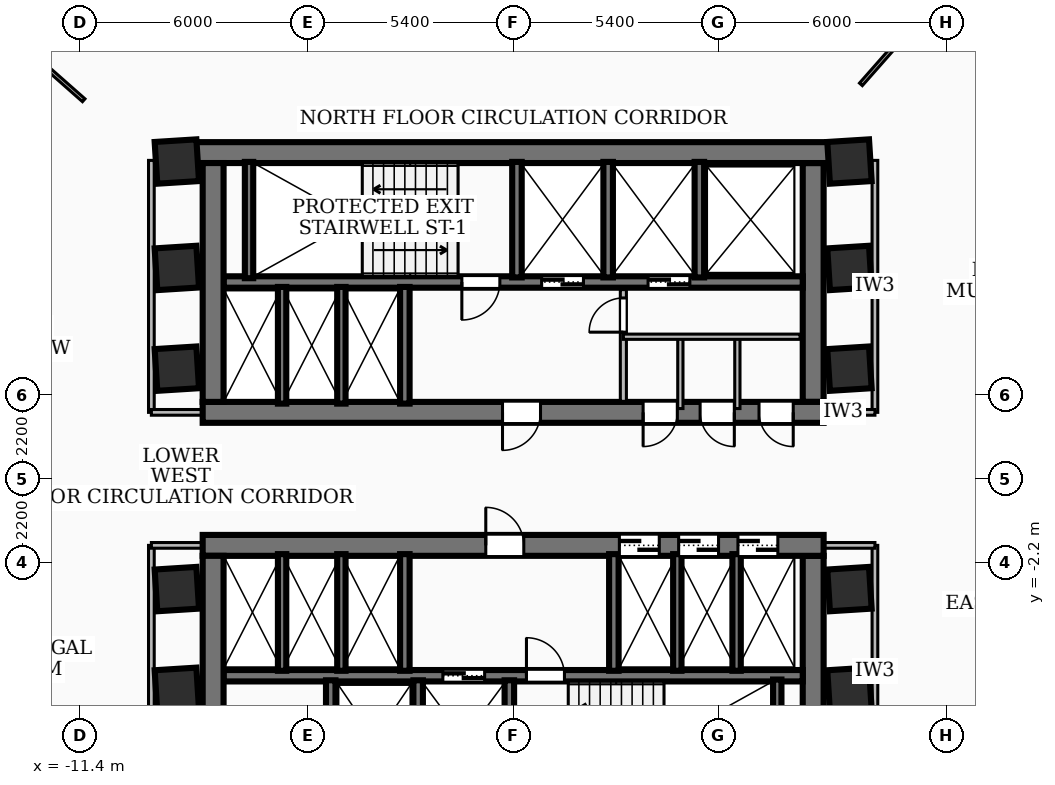
"""IFC4 building model, lengths in metres.
Left out: names, types, materials, properties, quantities, classifications, styles, units other than length and angle.
Written with IfcOpenShell. Run it as: python <this file> out.ifc"""

import sys

from ifc_helpers import new_model, si_unit, direction, frame, frame_2d, origin, origin_2d, place, context, subcontext, project, spatial, rectangle, extrude, element, fill, save


model = new_model("IFC4")
c1 = context("Model", 3, precision=1e-05, world=origin(), true_north=direction((0.0, 1.0)))
c2 = subcontext(c1, "Body", "Model", "MODEL_VIEW")
j1 = project(units=[si_unit("LENGTHUNIT", "METRE"), si_unit("PLANEANGLEUNIT", "RADIAN")], contexts=[c1])
p1 = place(None, origin())
s1 = spatial("IfcSite", under=j1, at=p1, CompositionType="ELEMENT")
p2 = place(p1, origin())
s2 = spatial("IfcBuilding", under=s1, at=p2, CompositionType="ELEMENT")
p3 = place(p2, frame((0.0, 0.0, 53.28)))
s3 = spatial("IfcBuildingStorey", under=s2, at=p3, CompositionType="ELEMENT", Elevation=53.28)
p4 = place(p3, frame((-8.78, 8.585, 0.0), z_axis=(0.0, 0.0, 1.0), x_axis=(1.0, 0.0, 0.0)))
e1 = element("IfcWall", 1, at=p4, inside=s3, PredefinedType="SHEAR", context=c2, shape_type="SweptSolid", body=[
    extrude(rectangle(XDim=17.56, YDim=0.55, at=frame_2d((8.78, 0.0))), origin(), (0.0, 0.0, 1.0), 3.32),
])
p5 = place(p3, frame((8.17, 1.75, 0.0), z_axis=(0.0, 0.0, 1.0), x_axis=(-1.0, 0.0, 0.0)))
e2 = element("IfcWall", 2, at=p5, inside=s3, PredefinedType="SHEAR", context=c2, shape_type="SweptSolid", body=[
    extrude(rectangle(XDim=16.34, YDim=0.55, at=frame_2d((8.17, 0.0))), origin(), (0.0, 0.0, 1.0), 3.32),
])
p6 = place(p5, frame((7.45, 0.0, 0.0)))
e3 = element("IfcOpeningElement", 3, at=p6, cuts=e2, PredefinedType="OPENING", context=c2, shape_type="SweptSolid", body=[
    extrude(rectangle(XDim=1.0, YDim=2.1, at=frame_2d((0.5, 1.05))), frame((0.0, 0.285, 0.0), z_axis=(0.0, -1.0, 0.0), x_axis=(1.0, 0.0, 0.0)), (0.0, 0.0, 1.0), 0.57),
])
p7 = place(p5, frame((3.85, 0.0, 0.0)))
e4 = element("IfcOpeningElement", 4, at=p7, cuts=e2, PredefinedType="OPENING", context=c2, shape_type="SweptSolid", body=[
    extrude(rectangle(XDim=0.9, YDim=2.06, at=frame_2d((0.45, 1.03))), frame((0.0, 0.285, 0.0), z_axis=(0.0, -1.0, 0.0), x_axis=(1.0, 0.0, 0.0)), (0.0, 0.0, 1.0), 0.57),
])
p8 = place(p5, frame((2.35, 0.0, 0.0)))
e5 = element("IfcOpeningElement", 5, at=p8, cuts=e2, PredefinedType="OPENING", context=c2, shape_type="SweptSolid", body=[
    extrude(rectangle(XDim=0.9, YDim=2.06, at=frame_2d((0.45, 1.03))), frame((0.0, 0.285, 0.0), z_axis=(0.0, -1.0, 0.0), x_axis=(1.0, 0.0, 0.0)), (0.0, 0.0, 1.0), 0.57),
])
p9 = place(p5, frame((0.8, 0.0, 0.0)))
e6 = element("IfcOpeningElement", 6, at=p9, cuts=e2, PredefinedType="OPENING", context=c2, shape_type="SweptSolid", body=[
    extrude(rectangle(XDim=0.9, YDim=2.06, at=frame_2d((0.45, 1.03))), frame((0.0, 0.285, 0.0), z_axis=(0.0, -1.0, 0.0), x_axis=(1.0, 0.0, 0.0)), (0.0, 0.0, 1.0), 0.57),
])
for number, where, z_axis, x_axis in (
    (7, (-7.895, 2.025, 0.0), (0.0, 0.0, 1.0), (0.0, 1.0, 0.0)),
    (8, (7.895, 8.31, 0.0), (0.0, 0.0, 1.0), (0.0, -1.0, 0.0)),
):
    element("IfcWall", number, at=place(p3, frame(where, z_axis=z_axis, x_axis=x_axis)), inside=s3, PredefinedType="SHEAR", context=c2, shape_type="SweptSolid", body=[
        extrude(rectangle(XDim=6.285, YDim=0.55, at=frame_2d((3.143, 0.0))), origin(), (0.0, 0.0, 1.0), 3.32),
    ])
p10 = place(p3, frame((7.62, 5.18, 0.0), z_axis=(0.0, 0.0, 1.0), x_axis=(-1.0, 0.0, 0.0)))
e9 = element("IfcWall", 9, at=p10, inside=s3, PredefinedType="SOLIDWALL", context=c2, shape_type="SweptSolid", body=[
    extrude(rectangle(XDim=15.24, YDim=0.3, at=frame_2d((7.62, 0.0))), origin(), (0.0, 0.0, 1.0), 3.32),
])
p11 = place(p10, frame((5.77, 0.0, 0.0)))
e10 = element("IfcOpeningElement", 10, at=p11, cuts=e9, PredefinedType="OPENING", context=c2, shape_type="SweptSolid", body=[
    extrude(rectangle(XDim=1.1, YDim=2.15, at=frame_2d((0.55, 1.075))), frame((0.0, 0.16, 0.0), z_axis=(0.0, -1.0, 0.0), x_axis=(1.0, 0.0, 0.0)), (0.0, 0.0, 1.0), 0.32),
])
p12 = place(p10, frame((2.97, 0.0, 0.0)))
e11 = element("IfcOpeningElement", 11, at=p12, cuts=e9, PredefinedType="OPENING", context=c2, shape_type="SweptSolid", body=[
    extrude(rectangle(XDim=1.1, YDim=2.15, at=frame_2d((0.55, 1.075))), frame((0.0, 0.16, 0.0), z_axis=(0.0, -1.0, 0.0), x_axis=(1.0, 0.0, 0.0)), (0.0, 0.0, 1.0), 0.32),
])
p13 = place(p10, frame((7.97, 0.0, 0.0)))
e12 = element("IfcOpeningElement", 12, at=p13, cuts=e9, PredefinedType="OPENING", context=c2, shape_type="SweptSolid", body=[
    extrude(rectangle(XDim=1.0, YDim=2.1, at=frame_2d((0.5, 1.05))), frame((0.0, 0.16, 0.0), z_axis=(0.0, -1.0, 0.0), x_axis=(1.0, 0.0, 0.0)), (0.0, 0.0, 1.0), 0.32),
])
p14 = place(p3, frame((-8.17, -1.75, 0.0), z_axis=(0.0, 0.0, 1.0), x_axis=(1.0, 0.0, 0.0)))
e13 = element("IfcWall", 13, at=p14, inside=s3, PredefinedType="SHEAR", context=c2, shape_type="SweptSolid", body=[
    extrude(rectangle(XDim=16.34, YDim=0.55, at=frame_2d((8.17, 0.0))), origin(), (0.0, 0.0, 1.0), 3.32),
])
p15 = place(p14, frame((7.45, 0.0, 0.0)))
e14 = element("IfcOpeningElement", 14, at=p15, cuts=e13, PredefinedType="OPENING", context=c2, shape_type="SweptSolid", body=[
    extrude(rectangle(XDim=1.0, YDim=2.1, at=frame_2d((0.5, 1.05))), frame((0.0, 0.285, 0.0), z_axis=(0.0, -1.0, 0.0), x_axis=(1.0, 0.0, 0.0)), (0.0, 0.0, 1.0), 0.57),
])
p16 = place(p14, frame((10.965, 0.0, 0.0)))
e15 = element("IfcOpeningElement", 15, at=p16, cuts=e13, PredefinedType="OPENING", context=c2, shape_type="SweptSolid", body=[
    extrude(rectangle(XDim=1.05, YDim=2.15, at=frame_2d((0.525, 1.075))), frame((0.0, 0.285, 0.0), z_axis=(0.0, -1.0, 0.0), x_axis=(1.0, 0.0, 0.0)), (0.0, 0.0, 1.0), 0.57),
])
p17 = place(p14, frame((12.525, 0.0, 0.0)))
e16 = element("IfcOpeningElement", 16, at=p17, cuts=e13, PredefinedType="OPENING", context=c2, shape_type="SweptSolid", body=[
    extrude(rectangle(XDim=1.05, YDim=2.15, at=frame_2d((0.525, 1.075))), frame((0.0, 0.285, 0.0), z_axis=(0.0, -1.0, 0.0), x_axis=(1.0, 0.0, 0.0)), (0.0, 0.0, 1.0), 0.57),
])
p18 = place(p14, frame((14.085, 0.0, 0.0)))
e17 = element("IfcOpeningElement", 17, at=p18, cuts=e13, PredefinedType="OPENING", context=c2, shape_type="SweptSolid", body=[
    extrude(rectangle(XDim=1.05, YDim=2.15, at=frame_2d((0.525, 1.075))), frame((0.0, 0.285, 0.0), z_axis=(0.0, -1.0, 0.0), x_axis=(1.0, 0.0, 0.0)), (0.0, 0.0, 1.0), 0.57),
])
for number, where, z_axis, x_axis in (
    (18, (-7.895, -8.31, 0.0), (0.0, 0.0, 1.0), (0.0, 1.0, 0.0)),
    (19, (7.895, -2.025, 0.0), (0.0, 0.0, 1.0), (0.0, -1.0, 0.0)),
):
    element("IfcWall", number, at=place(p3, frame(where, z_axis=z_axis, x_axis=x_axis)), inside=s3, PredefinedType="SHEAR", context=c2, shape_type="SweptSolid", body=[
        extrude(rectangle(XDim=6.285, YDim=0.55, at=frame_2d((3.143, 0.0))), origin(), (0.0, 0.0, 1.0), 3.32),
    ])
p19 = place(p3, frame((-7.62, -5.18, 0.0), z_axis=(0.0, 0.0, 1.0), x_axis=(1.0, 0.0, 0.0)))
e20 = element("IfcWall", 20, at=p19, inside=s3, PredefinedType="SOLIDWALL", context=c2, shape_type="SweptSolid", body=[
    extrude(rectangle(XDim=15.24, YDim=0.3, at=frame_2d((7.62, 0.0))), origin(), (0.0, 0.0, 1.0), 3.32),
])
p20 = place(p19, frame((5.77, 0.0, 0.0)))
e21 = element("IfcOpeningElement", 21, at=p20, cuts=e20, PredefinedType="OPENING", context=c2, shape_type="SweptSolid", body=[
    extrude(rectangle(XDim=1.1, YDim=2.15, at=frame_2d((0.55, 1.075))), frame((0.0, 0.16, 0.0), z_axis=(0.0, -1.0, 0.0), x_axis=(1.0, 0.0, 0.0)), (0.0, 0.0, 1.0), 0.32),
])
p21 = place(p19, frame((7.97, 0.0, 0.0)))
e22 = element("IfcOpeningElement", 22, at=p21, cuts=e20, PredefinedType="OPENING", context=c2, shape_type="SweptSolid", body=[
    extrude(rectangle(XDim=1.0, YDim=2.1, at=frame_2d((0.5, 1.05))), frame((0.0, 0.16, 0.0), z_axis=(0.0, -1.0, 0.0), x_axis=(1.0, 0.0, 0.0)), (0.0, 0.0, 1.0), 0.32),
])
for number, where, z_axis, x_axis in (
    (23, (-6.95, 5.28, 0.0), (0.0, 0.0, 1.0), (0.0, 1.0, 0.0)),
    (24, (6.95, -8.34, 0.0), (0.0, 0.0, 1.0), (0.0, 1.0, 0.0)),
):
    element("IfcWall", number, at=place(p3, frame(where, z_axis=z_axis, x_axis=x_axis)), inside=s3, PredefinedType="SOLIDWALL", context=c2, shape_type="SweptSolid", body=[
        extrude(rectangle(XDim=3.06, YDim=0.22, at=frame_2d((1.53, 0.0))), origin(), (0.0, 0.0, 1.0), 3.32),
    ])
for number, where, z_axis, x_axis in (
    (25, (0.1, 5.3, 0.0), (0.0, 0.0, 1.0), (0.0, 1.0, 0.0)),
    (26, (2.5, 5.3, 0.0), (0.0, 0.0, 1.0), (0.0, 1.0, 0.0)),
    (27, (4.9, 5.3, 0.0), (0.0, 0.0, 1.0), (0.0, 1.0, 0.0)),
):
    element("IfcWall", number, at=place(p3, frame(where, z_axis=z_axis, x_axis=x_axis)), inside=s3, PredefinedType="SOLIDWALL", context=c2, shape_type="SweptSolid", body=[
        extrude(rectangle(XDim=3.04, YDim=0.25, at=frame_2d((1.52, 0.0))), origin(), (0.0, 0.0, 1.0), 3.32),
    ])
p22 = place(p3, frame((-2.85, 1.98, 0.0), z_axis=(0.0, 0.0, 1.0), x_axis=(0.0, 1.0, 0.0)))
e28 = element("IfcWall", 28, at=p22, inside=s3, PredefinedType="SOLIDWALL", context=c2, shape_type="SweptSolid", body=[
    extrude(rectangle(XDim=3.07, YDim=0.25, at=frame_2d((1.535, 0.0))), origin(), (0.0, 0.0, 1.0), 3.32),
])
for number, where, z_axis, x_axis in (
    (29, (-0.1, -8.34, 0.0), (0.0, 0.0, 1.0), (0.0, 1.0, 0.0)),
    (30, (-2.5, -8.34, 0.0), (0.0, 0.0, 1.0), (0.0, 1.0, 0.0)),
    (31, (-4.8, -8.34, 0.0), (0.0, 0.0, 1.0), (0.0, 1.0, 0.0)),
):
    element("IfcWall", number, at=place(p3, frame(where, z_axis=z_axis, x_axis=x_axis)), inside=s3, PredefinedType="SOLIDWALL", context=c2, shape_type="SweptSolid", body=[
        extrude(rectangle(XDim=3.04, YDim=0.25, at=frame_2d((1.52, 0.0))), origin(), (0.0, 0.0, 1.0), 3.32),
    ])
for number, where, z_axis, x_axis in (
    (32, (-2.85, -5.05, 0.0), (0.0, 0.0, 1.0), (0.0, 1.0, 0.0)),
    (33, (2.65, -5.05, 0.0), (0.0, 0.0, 1.0), (0.0, 1.0, 0.0)),
):
    element("IfcWall", number, at=place(p3, frame(where, z_axis=z_axis, x_axis=x_axis)), inside=s3, PredefinedType="SOLIDWALL", context=c2, shape_type="SweptSolid", body=[
        extrude(rectangle(XDim=3.07, YDim=0.25, at=frame_2d((1.535, 0.0))), origin(), (0.0, 0.0, 1.0), 3.32),
    ])
for number, where, z_axis, x_axis in (
    (34, (-6.08, 1.98, 0.0), (0.0, 0.0, 1.0), (0.0, 1.0, 0.0)),
    (35, (-4.52, 1.98, 0.0), (0.0, 0.0, 1.0), (0.0, 1.0, 0.0)),
    (36, (4.32, -5.05, 0.0), (0.0, 0.0, 1.0), (0.0, 1.0, 0.0)),
    (37, (5.88, -5.05, 0.0), (0.0, 0.0, 1.0), (0.0, 1.0, 0.0)),
    (38, (-6.08, -5.05, 0.0), (0.0, 0.0, 1.0), (0.0, 1.0, 0.0)),
    (39, (-4.52, -5.05, 0.0), (0.0, 0.0, 1.0), (0.0, 1.0, 0.0)),
):
    element("IfcWall", number, at=place(p3, frame(where, z_axis=z_axis, x_axis=x_axis)), inside=s3, PredefinedType="SOLIDWALL", context=c2, shape_type="SweptSolid", body=[
        extrude(rectangle(XDim=3.07, YDim=0.22, at=frame_2d((1.535, 0.0))), origin(), (0.0, 0.0, 1.0), 3.32),
    ])
for number, where, z_axis, x_axis in (
    (40, (-8.85, -5.55, 0.0), (0.0, 0.0, 1.0), (0.998, 0.063, 0.0)),
    (41, (-8.85, -2.9, 0.0), (0.0, 0.0, 1.0), (0.998, 0.063, 0.0)),
    (42, (-8.85, 2.9, 0.0), (0.0, 0.0, 1.0), (0.998, 0.063, 0.0)),
    (43, (-8.85, 5.55, 0.0), (0.0, 0.0, 1.0), (0.998, 0.063, 0.0)),
    (44, (8.85, -5.55, 0.0), (0.0, 0.0, 1.0), (0.998, 0.063, 0.0)),
    (45, (8.85, -2.9, 0.0), (0.0, 0.0, 1.0), (0.998, 0.063, 0.0)),
    (46, (8.85, 2.9, 0.0), (0.0, 0.0, 1.0), (0.998, 0.063, 0.0)),
    (47, (8.85, 5.55, 0.0), (0.0, 0.0, 1.0), (0.998, 0.063, 0.0)),
    (48, (-8.85, 8.35, 0.0), (0.0, 0.0, 1.0), (0.998, 0.063, 0.0)),
    (49, (8.85, 8.35, 0.0), (0.0, 0.0, 1.0), (0.998, 0.063, 0.0)),
):
    element("IfcColumn", number, at=place(p3, frame(where, z_axis=z_axis, x_axis=x_axis)), inside=s3, PredefinedType="COLUMN", context=c2, shape_type="SweptSolid", body=[
        extrude(rectangle(XDim=1.1, YDim=1.1, at=origin_2d()), origin(), (0.0, 0.0, 1.0), 3.6),
    ])
p23 = place(p3, frame((2.9, 2.04, 0.0), z_axis=(0.0, 0.0, 1.0), x_axis=(0.0, 1.0, 0.0)))
e50 = element("IfcWall", 50, at=p23, inside=s3, PredefinedType="PARTITIONING", context=c2, shape_type="SweptSolid", body=[
    extrude(rectangle(XDim=2.94, YDim=0.16, at=frame_2d((1.47, 0.0))), origin(), (0.0, 0.0, 1.0), 2.385),
])
p24 = place(p23, frame((1.82, 0.0, 0.0)))
e51 = element("IfcOpeningElement", 51, at=p24, cuts=e50, PredefinedType="OPENING", context=c2, shape_type="SweptSolid", body=[
    extrude(rectangle(XDim=0.9, YDim=2.06, at=frame_2d((0.45, 1.03))), frame((0.0, 0.09, 0.0), z_axis=(0.0, -1.0, 0.0), x_axis=(1.0, 0.0, 0.0)), (0.0, 0.0, 1.0), 0.18),
])
p25 = place(p3, frame((2.9, 3.74, 0.0), z_axis=(0.0, 0.0, 1.0), x_axis=(1.0, 0.0, 0.0)))
e52 = element("IfcWall", 52, at=p25, inside=s3, PredefinedType="PARTITIONING", context=c2, shape_type="SweptSolid", body=[
    extrude(rectangle(XDim=4.65, YDim=0.138, at=frame_2d((2.325, 0.0))), origin(), (0.0, 0.0, 1.0), 3.32),
])
for number, where, z_axis, x_axis in (
    (53, (4.4, 1.85, 0.0), (0.0, 0.0, 1.0), (0.0, 1.0, 0.0)),
    (54, (5.9, 1.85, 0.0), (0.0, 0.0, 1.0), (0.0, 1.0, 0.0)),
):
    element("IfcWall", number, at=place(p3, frame(where, z_axis=z_axis, x_axis=x_axis)), inside=s3, PredefinedType="PARTITIONING", context=c2, shape_type="SweptSolid", body=[
        extrude(rectangle(XDim=1.89, YDim=0.138, at=frame_2d((0.945, 0.0))), origin(), (0.0, 0.0, 1.0), 2.385),
    ])
p26 = place(p3, frame((-9.52, 1.75, 0.0), z_axis=(0.0, 0.0, 1.0), x_axis=(0.0, 1.0, 0.0)))
e55 = element("IfcWall", 55, at=p26, inside=s3, PredefinedType="PARTITIONING", context=c2, shape_type="SweptSolid", body=[
    extrude(rectangle(XDim=6.63, YDim=0.15, at=frame_2d((3.315, 0.0))), origin(), (0.0, 0.0, 1.0), 2.401),
])
p27 = place(p3, frame((-7.85, 1.75, 0.0), z_axis=(0.0, 0.0, 1.0), x_axis=(-1.0, 0.0, 0.0)))
e56 = element("IfcWall", 56, at=p27, inside=s3, PredefinedType="PARTITIONING", context=c2, shape_type="SweptSolid", body=[
    extrude(rectangle(XDim=1.67, YDim=0.15, at=frame_2d((0.835, 0.0))), origin(), (0.0, 0.0, 1.0), 2.385),
])
p28 = place(p3, frame((-9.52, -8.38, 0.0), z_axis=(0.0, 0.0, 1.0), x_axis=(0.0, 1.0, 0.0)))
e57 = element("IfcWall", 57, at=p28, inside=s3, PredefinedType="PARTITIONING", context=c2, shape_type="SweptSolid", body=[
    extrude(rectangle(XDim=6.63, YDim=0.15, at=frame_2d((3.315, 0.0))), origin(), (0.0, 0.0, 1.0), 2.401),
])
p29 = place(p3, frame((-7.85, -1.75, 0.0), z_axis=(0.0, 0.0, 1.0), x_axis=(-1.0, 0.0, 0.0)))
e58 = element("IfcWall", 58, at=p29, inside=s3, PredefinedType="PARTITIONING", context=c2, shape_type="SweptSolid", body=[
    extrude(rectangle(XDim=1.67, YDim=0.15, at=frame_2d((0.835, 0.0))), origin(), (0.0, 0.0, 1.0), 2.385),
])
p30 = place(p3, frame((9.52, 1.75, 0.0), z_axis=(0.0, 0.0, 1.0), x_axis=(0.0, 1.0, 0.0)))
e59 = element("IfcWall", 59, at=p30, inside=s3, PredefinedType="PARTITIONING", context=c2, shape_type="SweptSolid", body=[
    extrude(rectangle(XDim=6.63, YDim=0.15, at=frame_2d((3.315, 0.0))), origin(), (0.0, 0.0, 1.0), 2.401),
])
p31 = place(p3, frame((7.85, 1.75, 0.0), z_axis=(0.0, 0.0, 1.0), x_axis=(1.0, 0.0, 0.0)))
e60 = element("IfcWall", 60, at=p31, inside=s3, PredefinedType="PARTITIONING", context=c2, shape_type="SweptSolid", body=[
    extrude(rectangle(XDim=1.67, YDim=0.15, at=frame_2d((0.835, 0.0))), origin(), (0.0, 0.0, 1.0), 2.385),
])
p32 = place(p3, frame((9.52, -8.38, 0.0), z_axis=(0.0, 0.0, 1.0), x_axis=(0.0, 1.0, 0.0)))
e61 = element("IfcWall", 61, at=p32, inside=s3, PredefinedType="PARTITIONING", context=c2, shape_type="SweptSolid", body=[
    extrude(rectangle(XDim=6.63, YDim=0.15, at=frame_2d((3.315, 0.0))), origin(), (0.0, 0.0, 1.0), 2.401),
])
p33 = place(p3, frame((7.85, -1.75, 0.0), z_axis=(0.0, 0.0, 1.0), x_axis=(1.0, 0.0, 0.0)))
e62 = element("IfcWall", 62, at=p33, inside=s3, PredefinedType="PARTITIONING", context=c2, shape_type="SweptSolid", body=[
    extrude(rectangle(XDim=1.67, YDim=0.15, at=frame_2d((0.835, 0.0))), origin(), (0.0, 0.0, 1.0), 2.385),
])
p34 = place(p3, frame((9.151, 10.38, 0.0), z_axis=(0.0, 0.0, 1.0), x_axis=(0.661373124857, 0.750057057641, 0.0)))
e63 = element("IfcWall", 63, at=p34, inside=s3, PredefinedType="PARTITIONING", context=c2, shape_type="SweptSolid", body=[
    extrude(rectangle(XDim=5.817, YDim=0.1, at=frame_2d((2.908, 0.0))), origin(), (0.0, 0.0, 1.0), 3.32),
])
p35 = place(p3, frame((-11.3, 9.962, 0.0), z_axis=(0.0, 0.0, 1.0), x_axis=(-0.750020974917, 0.661414043686, 0.0)))
e64 = element("IfcWall", 64, at=p35, inside=s3, PredefinedType="PARTITIONING", context=c2, shape_type="SweptSolid", body=[
    extrude(rectangle(XDim=4.59, YDim=0.1, at=frame_2d((2.295, 0.0))), origin(), (0.0, 0.0, 1.0), 3.32),
])
p36 = place(p6, origin())
e65 = element("IfcDoor", 65, at=p36, inside=s3, OperationType="SINGLE_SWING_RIGHT", PredefinedType="DOOR", context=c2, shape_type="SweptSolid", body=[
    extrude(rectangle(XDim=1.0, YDim=2.1, at=frame_2d((0.5, 1.05))), frame((0.0, 0.025, 0.0), z_axis=(0.0, -1.0, 0.0), x_axis=(1.0, 0.0, 0.0)), (0.0, 0.0, 1.0), 0.05),
])
fill(e3, e65)
p37 = place(p15, origin())
e66 = element("IfcDoor", 66, at=p37, inside=s3, OperationType="SINGLE_SWING_LEFT", PredefinedType="DOOR", context=c2, shape_type="SweptSolid", body=[
    extrude(rectangle(XDim=1.0, YDim=2.1, at=frame_2d((0.5, 1.05))), frame((0.0, 0.025, 0.0), z_axis=(0.0, -1.0, 0.0), x_axis=(1.0, 0.0, 0.0)), (0.0, 0.0, 1.0), 0.05),
])
fill(e14, e66)
p38 = place(p11, origin())
e67 = element("IfcDoor", 67, at=p38, inside=s3, OperationType="DOUBLE_DOOR_SLIDING", PredefinedType="DOOR", context=c2, shape_type="SweptSolid", body=[
    extrude(rectangle(XDim=1.1, YDim=2.15, at=frame_2d((0.55, 1.075))), frame((0.0, 0.025, 0.0), z_axis=(0.0, -1.0, 0.0), x_axis=(1.0, 0.0, 0.0)), (0.0, 0.0, 1.0), 0.05),
])
fill(e10, e67)
p39 = place(p12, origin())
e68 = element("IfcDoor", 68, at=p39, inside=s3, OperationType="DOUBLE_DOOR_SLIDING", PredefinedType="DOOR", context=c2, shape_type="SweptSolid", body=[
    extrude(rectangle(XDim=1.1, YDim=2.15, at=frame_2d((0.55, 1.075))), frame((0.0, 0.025, 0.0), z_axis=(0.0, -1.0, 0.0), x_axis=(1.0, 0.0, 0.0)), (0.0, 0.0, 1.0), 0.05),
])
fill(e11, e68)
p40 = place(p13, origin())
e69 = element("IfcDoor", 69, at=p40, inside=s3, OperationType="SINGLE_SWING_RIGHT", PredefinedType="DOOR", context=c2, shape_type="SweptSolid", body=[
    extrude(rectangle(XDim=1.0, YDim=2.1, at=frame_2d((0.5, 1.05))), frame((0.0, 0.025, 0.0), z_axis=(0.0, -1.0, 0.0), x_axis=(1.0, 0.0, 0.0)), (0.0, 0.0, 1.0), 0.05),
])
fill(e12, e69)
p41 = place(p20, origin())
e70 = element("IfcDoor", 70, at=p41, inside=s3, OperationType="DOUBLE_DOOR_SLIDING", PredefinedType="DOOR", context=c2, shape_type="SweptSolid", body=[
    extrude(rectangle(XDim=1.1, YDim=2.15, at=frame_2d((0.55, 1.075))), frame((0.0, 0.025, 0.0), z_axis=(0.0, -1.0, 0.0), x_axis=(1.0, 0.0, 0.0)), (0.0, 0.0, 1.0), 0.05),
])
fill(e21, e70)
p42 = place(p21, origin())
e71 = element("IfcDoor", 71, at=p42, inside=s3, OperationType="SINGLE_SWING_LEFT", PredefinedType="DOOR", context=c2, shape_type="SweptSolid", body=[
    extrude(rectangle(XDim=1.0, YDim=2.1, at=frame_2d((0.5, 1.05))), frame((0.0, 0.025, 0.0), z_axis=(0.0, -1.0, 0.0), x_axis=(1.0, 0.0, 0.0)), (0.0, 0.0, 1.0), 0.05),
])
fill(e22, e71)
p43 = place(p16, origin())
e72 = element("IfcDoor", 72, at=p43, inside=s3, OperationType="DOUBLE_DOOR_SLIDING", PredefinedType="DOOR", context=c2, shape_type="SweptSolid", body=[
    extrude(rectangle(XDim=1.05, YDim=2.15, at=frame_2d((0.525, 1.075))), frame((0.0, 0.025, 0.0), z_axis=(0.0, -1.0, 0.0), x_axis=(1.0, 0.0, 0.0)), (0.0, 0.0, 1.0), 0.05),
])
fill(e15, e72)
p44 = place(p17, origin())
e73 = element("IfcDoor", 73, at=p44, inside=s3, OperationType="DOUBLE_DOOR_SLIDING", PredefinedType="DOOR", context=c2, shape_type="SweptSolid", body=[
    extrude(rectangle(XDim=1.05, YDim=2.15, at=frame_2d((0.525, 1.075))), frame((0.0, 0.025, 0.0), z_axis=(0.0, -1.0, 0.0), x_axis=(1.0, 0.0, 0.0)), (0.0, 0.0, 1.0), 0.05),
])
fill(e16, e73)
p45 = place(p18, origin())
e74 = element("IfcDoor", 74, at=p45, inside=s3, OperationType="DOUBLE_DOOR_SLIDING", PredefinedType="DOOR", context=c2, shape_type="SweptSolid", body=[
    extrude(rectangle(XDim=1.05, YDim=2.15, at=frame_2d((0.525, 1.075))), frame((0.0, 0.025, 0.0), z_axis=(0.0, -1.0, 0.0), x_axis=(1.0, 0.0, 0.0)), (0.0, 0.0, 1.0), 0.05),
])
fill(e17, e74)
p46 = place(p7, origin())
e75 = element("IfcDoor", 75, at=p46, inside=s3, OperationType="SINGLE_SWING_RIGHT", PredefinedType="DOOR", context=c2, shape_type="SweptSolid", body=[
    extrude(rectangle(XDim=0.9, YDim=2.06, at=frame_2d((0.45, 1.03))), frame((0.0, 0.025, 0.0), z_axis=(0.0, -1.0, 0.0), x_axis=(1.0, 0.0, 0.0)), (0.0, 0.0, 1.0), 0.05),
])
fill(e4, e75)
p47 = place(p8, origin())
e76 = element("IfcDoor", 76, at=p47, inside=s3, OperationType="SINGLE_SWING_LEFT", PredefinedType="DOOR", context=c2, shape_type="SweptSolid", body=[
    extrude(rectangle(XDim=0.9, YDim=2.06, at=frame_2d((0.45, 1.03))), frame((0.0, 0.025, 0.0), z_axis=(0.0, -1.0, 0.0), x_axis=(1.0, 0.0, 0.0)), (0.0, 0.0, 1.0), 0.05),
])
fill(e5, e76)
p48 = place(p9, origin())
e77 = element("IfcDoor", 77, at=p48, inside=s3, OperationType="SINGLE_SWING_LEFT", PredefinedType="DOOR", context=c2, shape_type="SweptSolid", body=[
    extrude(rectangle(XDim=0.9, YDim=2.06, at=frame_2d((0.45, 1.03))), frame((0.0, 0.025, 0.0), z_axis=(0.0, -1.0, 0.0), x_axis=(1.0, 0.0, 0.0)), (0.0, 0.0, 1.0), 0.05),
])
fill(e6, e77)
p49 = place(p24, origin())
e78 = element("IfcDoor", 78, at=p49, inside=s3, OperationType="SINGLE_SWING_LEFT", PredefinedType="DOOR", context=c2, shape_type="SweptSolid", body=[
    extrude(rectangle(XDim=0.9, YDim=2.06, at=frame_2d((0.45, 1.03))), frame((0.0, 0.025, 0.0), z_axis=(0.0, -1.0, 0.0), x_axis=(1.0, 0.0, 0.0)), (0.0, 0.0, 1.0), 0.05),
])
fill(e51, e78)
save(model, sys.argv[1])
